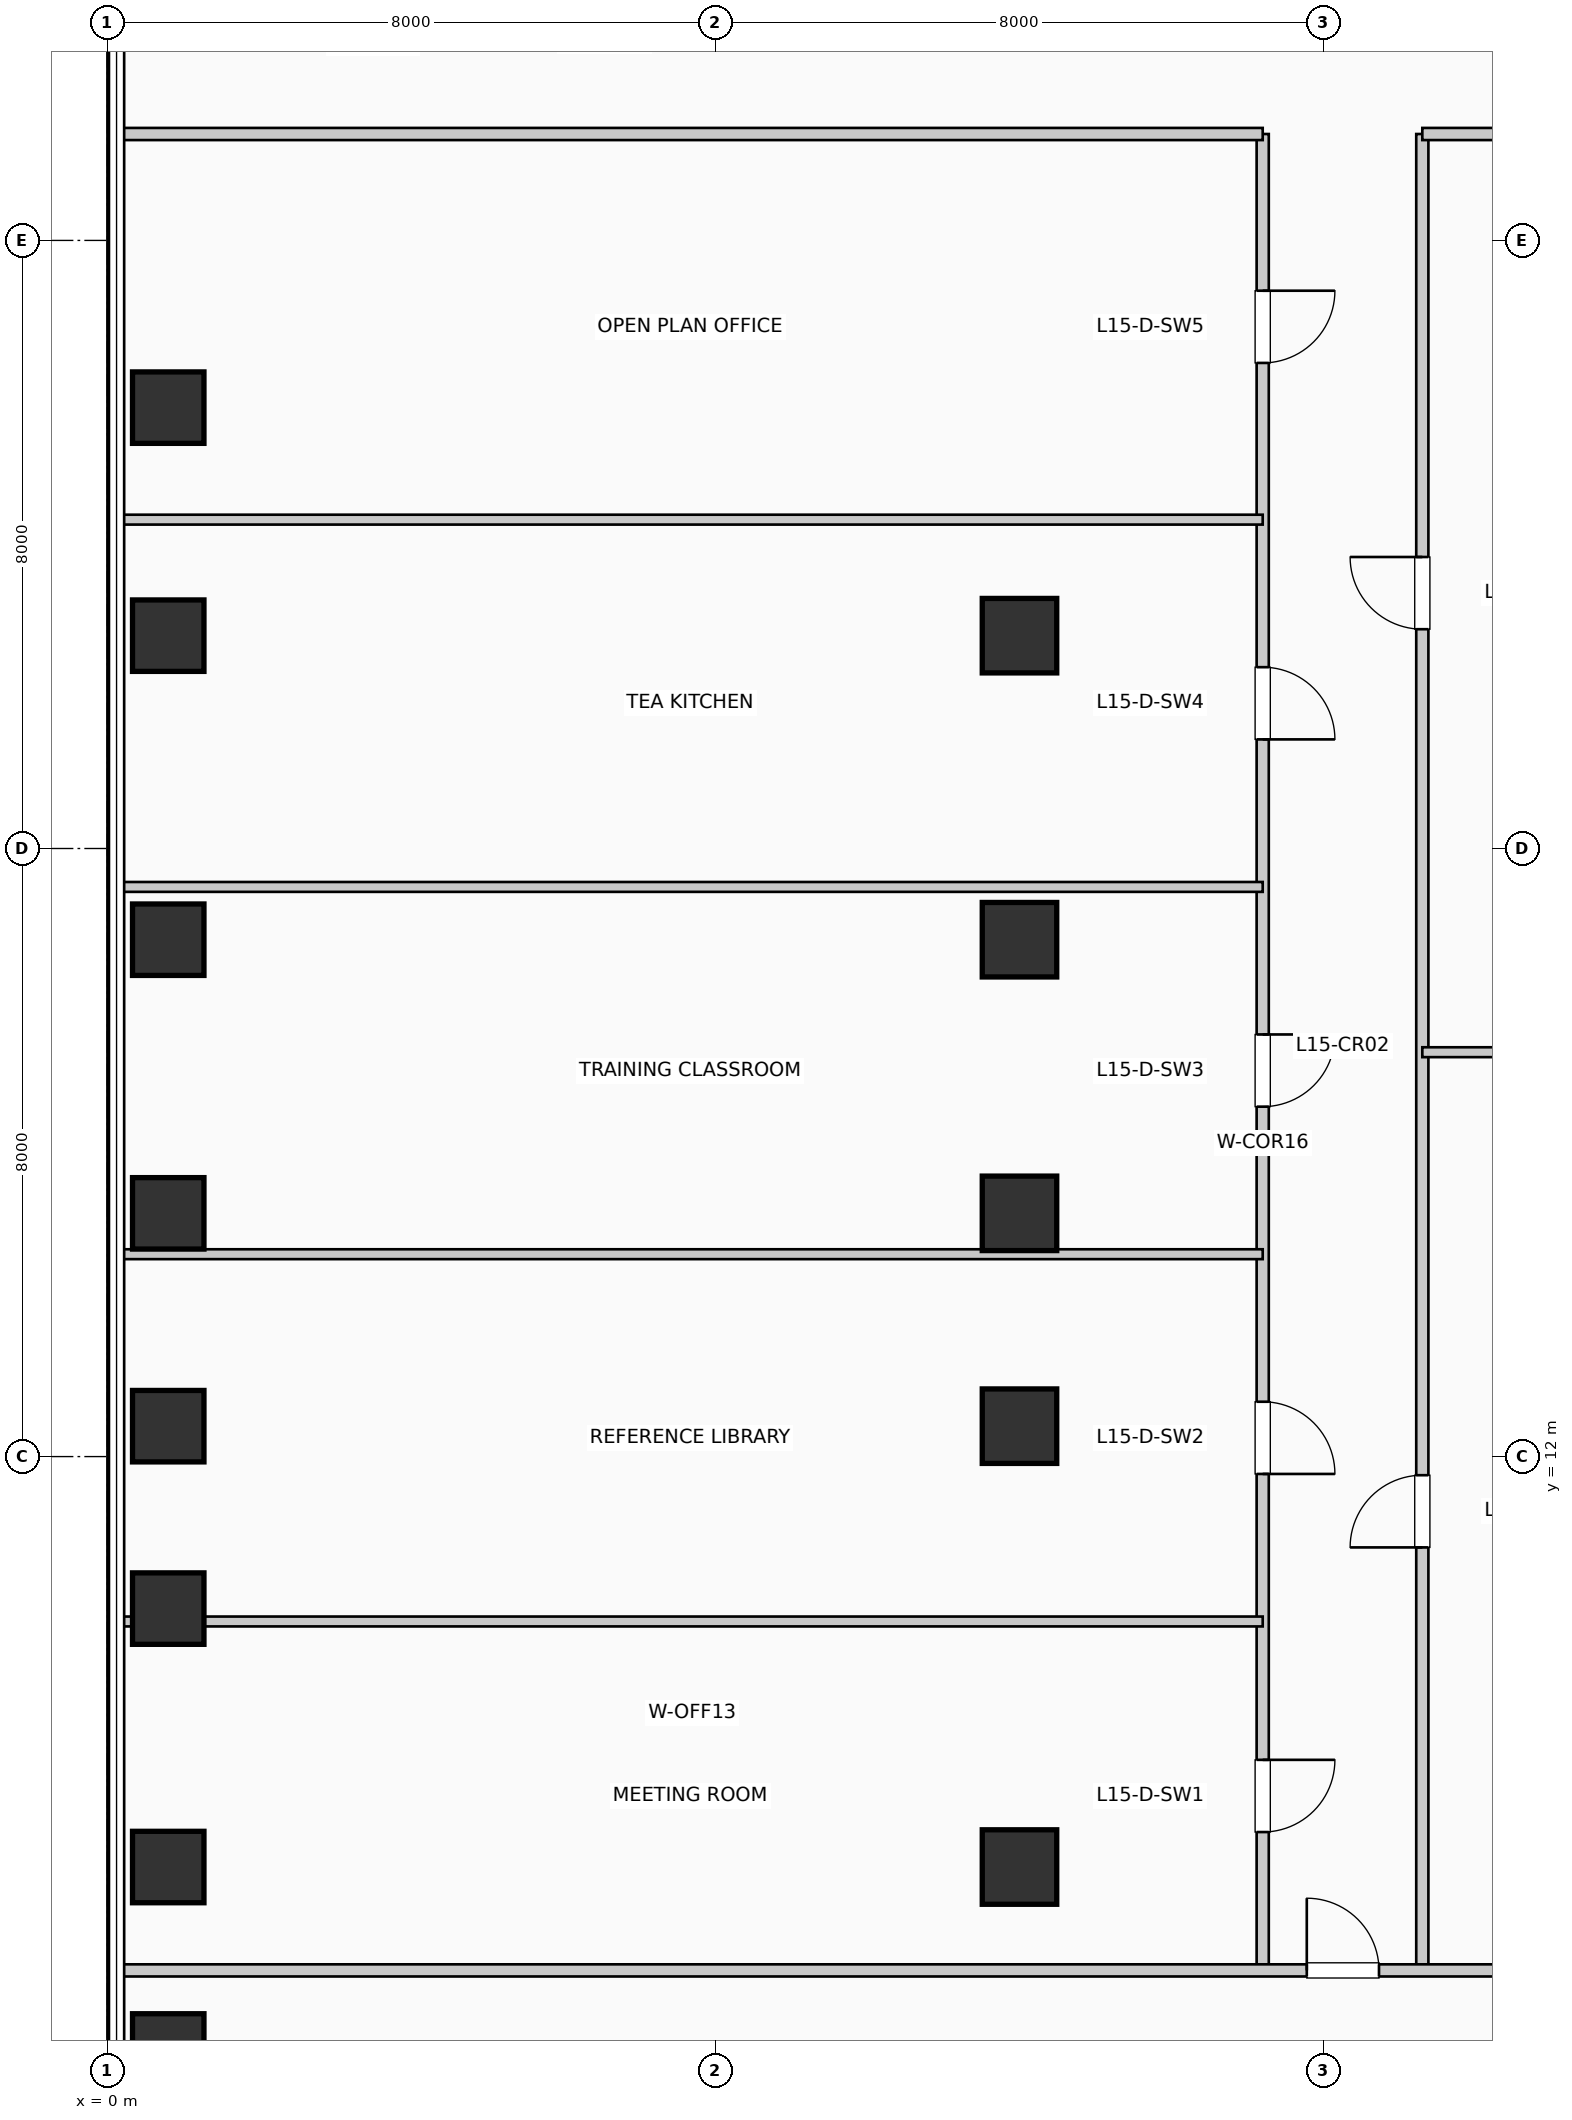
"""IFC4 building model, lengths in metres.
Left out: names, types, materials, properties, quantities, classifications, styles, units other than length and angle.
Written with IfcOpenShell. Run it as: python <this file> out.ifc"""

import sys

from ifc_helpers import new_model, si_unit, direction, frame, frame_2d, origin, origin_2d, place, context, subcontext, project, spatial, rectangle, extrude, element, fill, save


model = new_model("IFC4")
c1 = context("Model", 3, precision=1e-05, world=origin(), true_north=direction((0.0, 1.0)))
c2 = subcontext(c1, "Body", "Model", "MODEL_VIEW")
j1 = project(units=[si_unit("LENGTHUNIT", "METRE"), si_unit("PLANEANGLEUNIT", "RADIAN")], contexts=[c1])
p1 = place(None, origin())
s1 = spatial("IfcSite", under=j1, at=p1, CompositionType="ELEMENT")
p2 = place(p1, origin())
s2 = spatial("IfcBuilding", under=s1, at=p2, CompositionType="ELEMENT")
p3 = place(p2, frame((0.0, 0.0, 66.0)))
s3 = spatial("IfcBuildingStorey", under=s2, at=p3, CompositionType="ELEMENT", Elevation=66.0)
for number, where, z_axis, x_axis in (
    (1, (0.8, 4.2, 0.0), (0.0, 0.0, 1.0), (1.0, 0.0, 0.0)),
    (2, (0.8, 6.6, 0.0), (0.0, 0.0, 1.0), (1.0, 0.0, 0.0)),
    (3, (0.8, 10.0, 0.0), (0.0, 0.0, 1.0), (1.0, 0.0, 0.0)),
    (4, (0.8, 12.4, 0.0), (0.0, 0.0, 1.0), (1.0, 0.0, 0.0)),
    (5, (0.8, 15.2, 0.0), (0.0, 0.0, 1.0), (1.0, 0.0, 0.0)),
    (6, (0.8, 18.8, 0.0), (0.0, 0.0, 1.0), (1.0, 0.0, 0.0)),
    (7, (0.8, 22.8, 0.0), (0.0, 0.0, 1.0), (1.0, 0.0, 0.0)),
    (8, (0.8, 25.8, 0.0), (0.0, 0.0, 1.0), (1.0, 0.0, 0.0)),
):
    element("IfcColumn", number, at=place(p3, frame(where, z_axis=z_axis, x_axis=x_axis)), inside=s3, PredefinedType="COLUMN", context=c2, shape_type="SweptSolid", body=[
        extrude(rectangle(XDim=0.94, YDim=0.94, at=origin_2d()), origin(), (0.0, 0.0, 1.0), 3.96),
    ])
for number, where, z_axis, x_axis in (
    (9, (12.0, 6.6, 0.0), (0.0, 0.0, 1.0), (1.0, 0.0, 0.0)),
    (10, (12.0, 12.4, 0.0), (0.0, 0.0, 1.0), (1.0, 0.0, 0.0)),
    (11, (12.0, 15.2, 0.0), (0.0, 0.0, 1.0), (1.0, 0.0, 0.0)),
    (12, (12.0, 18.8, 0.0), (0.0, 0.0, 1.0), (1.0, 0.0, 0.0)),
    (13, (12.0, 22.8, 0.0), (0.0, 0.0, 1.0), (1.0, 0.0, 0.0)),
):
    element("IfcColumn", number, at=place(p3, frame(where, z_axis=z_axis, x_axis=x_axis)), inside=s3, PredefinedType="COLUMN", context=c2, shape_type="SweptSolid", body=[
        extrude(rectangle(XDim=0.98, YDim=0.98, at=origin_2d()), origin(), (0.0, 0.0, 1.0), 3.96),
    ])
p4 = place(p3, frame((15.2, 5.24, 0.0), z_axis=(0.0, 0.0, 1.0), x_axis=(0.0, 1.0, 0.0)))
e14 = element("IfcWall", 14, at=p4, inside=s3, PredefinedType="PARTITIONING", context=c2, shape_type="SweptSolid", body=[
    extrude(rectangle(XDim=24.16, YDim=0.16, at=frame_2d((12.08, 0.0))), origin(), (0.0, 0.0, 1.0), 3.71),
])
p5 = place(p4, frame((2.77, 0.0, 0.0), z_axis=(0.0, 0.0, 1.0), x_axis=(-1.0, 0.0, 0.0)))
e15 = element("IfcOpeningElement", 15, at=p5, cuts=e14, PredefinedType="OPENING", context=c2, shape_type="SweptSolid", body=[
    extrude(rectangle(XDim=0.95, YDim=2.15, at=frame_2d((0.475, 1.075))), frame((0.0, 0.09, 0.0), z_axis=(0.0, -1.0, 0.0), x_axis=(1.0, 0.0, 0.0)), (0.0, 0.0, 1.0), 0.18),
])
p6 = place(p4, frame((7.481, 0.0, 0.0), z_axis=(0.0, 0.0, 1.0), x_axis=(-1.0, 0.0, 0.0)))
e16 = element("IfcOpeningElement", 16, at=p6, cuts=e14, PredefinedType="OPENING", context=c2, shape_type="SweptSolid", body=[
    extrude(rectangle(XDim=0.95, YDim=2.15, at=frame_2d((0.475, 1.075))), frame((0.0, 0.09, 0.0), z_axis=(0.0, -1.0, 0.0), x_axis=(1.0, 0.0, 0.0)), (0.0, 0.0, 1.0), 0.18),
])
p7 = place(p4, frame((12.313, 0.0, 0.0), z_axis=(0.0, 0.0, 1.0), x_axis=(-1.0, 0.0, 0.0)))
e17 = element("IfcOpeningElement", 17, at=p7, cuts=e14, PredefinedType="OPENING", context=c2, shape_type="SweptSolid", body=[
    extrude(rectangle(XDim=0.95, YDim=2.15, at=frame_2d((0.475, 1.075))), frame((0.0, 0.09, 0.0), z_axis=(0.0, -1.0, 0.0), x_axis=(1.0, 0.0, 0.0)), (0.0, 0.0, 1.0), 0.18),
])
p8 = place(p4, frame((17.145, 0.0, 0.0), z_axis=(0.0, 0.0, 1.0), x_axis=(-1.0, 0.0, 0.0)))
e18 = element("IfcOpeningElement", 18, at=p8, cuts=e14, PredefinedType="OPENING", context=c2, shape_type="SweptSolid", body=[
    extrude(rectangle(XDim=0.95, YDim=2.15, at=frame_2d((0.475, 1.075))), frame((0.0, 0.09, 0.0), z_axis=(0.0, -1.0, 0.0), x_axis=(1.0, 0.0, 0.0)), (0.0, 0.0, 1.0), 0.18),
])
p9 = place(p4, frame((22.098, 0.0, 0.0), z_axis=(0.0, 0.0, 1.0), x_axis=(-1.0, 0.0, 0.0)))
e19 = element("IfcOpeningElement", 19, at=p9, cuts=e14, PredefinedType="OPENING", context=c2, shape_type="SweptSolid", body=[
    extrude(rectangle(XDim=0.95, YDim=2.15, at=frame_2d((0.475, 1.075))), frame((0.0, 0.09, 0.0), z_axis=(0.0, -1.0, 0.0), x_axis=(1.0, 0.0, 0.0)), (0.0, 0.0, 1.0), 0.18),
])
p10 = place(p3, frame((17.3, 5.24, 0.0), z_axis=(0.0, 0.0, 1.0), x_axis=(0.0, 1.0, 0.0)))
e20 = element("IfcWall", 20, at=p10, inside=s3, PredefinedType="PARTITIONING", context=c2, shape_type="SweptSolid", body=[
    extrude(rectangle(XDim=24.16, YDim=0.16, at=frame_2d((12.08, 0.0))), origin(), (0.0, 0.0, 1.0), 3.71),
])
p11 = place(p10, frame((5.565, 0.0, 0.0)))
e21 = element("IfcOpeningElement", 21, at=p11, cuts=e20, PredefinedType="OPENING", context=c2, shape_type="SweptSolid", body=[
    extrude(rectangle(XDim=0.95, YDim=2.15, at=frame_2d((0.475, 1.075))), frame((0.0, 0.09, 0.0), z_axis=(0.0, -1.0, 0.0), x_axis=(1.0, 0.0, 0.0)), (0.0, 0.0, 1.0), 0.18),
])
p12 = place(p10, frame((17.645, 0.0, 0.0)))
e22 = element("IfcOpeningElement", 22, at=p12, cuts=e20, PredefinedType="OPENING", context=c2, shape_type="SweptSolid", body=[
    extrude(rectangle(XDim=0.95, YDim=2.15, at=frame_2d((0.475, 1.075))), frame((0.0, 0.09, 0.0), z_axis=(0.0, -1.0, 0.0), x_axis=(1.0, 0.0, 0.0)), (0.0, 0.0, 1.0), 0.18),
])
p13 = place(p3, frame((0.19, 5.24, 0.0), z_axis=(0.0, 0.0, 1.0), x_axis=(1.0, 0.0, 0.0)))
e23 = element("IfcWall", 23, at=p13, inside=s3, PredefinedType="PARTITIONING", context=c2, shape_type="SweptSolid", body=[
    extrude(rectangle(XDim=23.26, YDim=0.16, at=frame_2d((11.63, 0.0))), origin(), (0.0, 0.0, 1.0), 3.71),
])
p14 = place(p13, frame((15.59, 0.0, 0.0)))
e24 = element("IfcOpeningElement", 24, at=p14, cuts=e23, PredefinedType="OPENING", context=c2, shape_type="SweptSolid", body=[
    extrude(rectangle(XDim=0.95, YDim=2.15, at=frame_2d((0.475, 1.075))), frame((0.0, 0.09, 0.0), z_axis=(0.0, -1.0, 0.0), x_axis=(1.0, 0.0, 0.0)), (0.0, 0.0, 1.0), 0.18),
])
p15 = place(p3, frame((0.19, 29.4, 0.0), z_axis=(0.0, 0.0, 1.0), x_axis=(1.0, 0.0, 0.0)))
e25 = element("IfcWall", 25, at=p15, inside=s3, PredefinedType="PARTITIONING", context=c2, shape_type="SweptSolid", body=[
    extrude(rectangle(XDim=15.01, YDim=0.16, at=frame_2d((7.505, 0.0))), origin(), (0.0, 0.0, 1.0), 3.365),
])
p16 = place(p3, frame((17.3, 29.4, 0.0), z_axis=(0.0, 0.0, 1.0), x_axis=(1.0, 0.0, 0.0)))
e26 = element("IfcWall", 26, at=p16, inside=s3, PredefinedType="PARTITIONING", context=c2, shape_type="SweptSolid", body=[
    extrude(rectangle(XDim=6.15, YDim=0.16, at=frame_2d((3.075, 0.0))), origin(), (0.0, 0.0, 1.0), 3.71),
])
p17 = place(p3, frame((0.19, 9.83, 0.0), z_axis=(0.0, 0.0, 1.0), x_axis=(1.0, 0.0, 0.0)))
e27 = element("IfcWall", 27, at=p17, inside=s3, PredefinedType="PARTITIONING", context=c2, shape_type="SweptSolid", body=[
    extrude(rectangle(XDim=15.01, YDim=0.13, at=frame_2d((7.505, 0.0))), origin(), (0.0, 0.0, 1.0), 2.995),
])
for number, where, z_axis, x_axis in (
    (28, (0.19, 14.662, 0.0), (0.0, 0.0, 1.0), (1.0, 0.0, 0.0)),
    (29, (0.19, 19.494, 0.0), (0.0, 0.0, 1.0), (1.0, 0.0, 0.0)),
    (30, (0.19, 24.326, 0.0), (0.0, 0.0, 1.0), (1.0, 0.0, 0.0)),
):
    element("IfcWall", number, at=place(p3, frame(where, z_axis=z_axis, x_axis=x_axis)), inside=s3, PredefinedType="PARTITIONING", context=c2, shape_type="SweptSolid", body=[
        extrude(rectangle(XDim=15.01, YDim=0.13, at=frame_2d((7.505, 0.0))), origin(), (0.0, 0.0, 1.0), 3.71),
    ])
p18 = place(p3, frame((17.3, 17.32, 0.0), z_axis=(0.0, 0.0, 1.0), x_axis=(1.0, 0.0, 0.0)))
e31 = element("IfcWall", 31, at=p18, inside=s3, PredefinedType="PARTITIONING", context=c2, shape_type="SweptSolid", body=[
    extrude(rectangle(XDim=6.15, YDim=0.13, at=frame_2d((3.075, 0.0))), origin(), (0.0, 0.0, 1.0), 3.71),
])
p19 = place(p14, origin())
e32 = element("IfcDoor", 32, at=p19, inside=s3, OperationType="SINGLE_SWING_LEFT", PredefinedType="DOOR", context=c2, shape_type="SweptSolid", body=[
    extrude(rectangle(XDim=0.95, YDim=2.15, at=frame_2d((0.475, 1.075))), frame((0.0, 0.025, 0.0), z_axis=(0.0, -1.0, 0.0), x_axis=(1.0, 0.0, 0.0)), (0.0, 0.0, 1.0), 0.05),
])
fill(e24, e32)
p20 = place(p5, origin())
e33 = element("IfcDoor", 33, at=p20, inside=s3, OperationType="SINGLE_SWING_RIGHT", PredefinedType="DOOR", context=c2, shape_type="SweptSolid", body=[
    extrude(rectangle(XDim=0.95, YDim=2.15, at=frame_2d((0.475, 1.075))), frame((0.0, 0.025, 0.0), z_axis=(0.0, -1.0, 0.0), x_axis=(1.0, 0.0, 0.0)), (0.0, 0.0, 1.0), 0.05),
])
fill(e15, e33)
p21 = place(p6, origin())
e34 = element("IfcDoor", 34, at=p21, inside=s3, OperationType="SINGLE_SWING_LEFT", PredefinedType="DOOR", context=c2, shape_type="SweptSolid", body=[
    extrude(rectangle(XDim=0.95, YDim=2.15, at=frame_2d((0.475, 1.075))), frame((0.0, 0.025, 0.0), z_axis=(0.0, -1.0, 0.0), x_axis=(1.0, 0.0, 0.0)), (0.0, 0.0, 1.0), 0.05),
])
fill(e16, e34)
p22 = place(p7, origin())
e35 = element("IfcDoor", 35, at=p22, inside=s3, OperationType="SINGLE_SWING_RIGHT", PredefinedType="DOOR", context=c2, shape_type="SweptSolid", body=[
    extrude(rectangle(XDim=0.95, YDim=2.15, at=frame_2d((0.475, 1.075))), frame((0.0, 0.025, 0.0), z_axis=(0.0, -1.0, 0.0), x_axis=(1.0, 0.0, 0.0)), (0.0, 0.0, 1.0), 0.05),
])
fill(e17, e35)
p23 = place(p8, origin())
e36 = element("IfcDoor", 36, at=p23, inside=s3, OperationType="SINGLE_SWING_LEFT", PredefinedType="DOOR", context=c2, shape_type="SweptSolid", body=[
    extrude(rectangle(XDim=0.95, YDim=2.15, at=frame_2d((0.475, 1.075))), frame((0.0, 0.025, 0.0), z_axis=(0.0, -1.0, 0.0), x_axis=(1.0, 0.0, 0.0)), (0.0, 0.0, 1.0), 0.05),
])
fill(e18, e36)
p24 = place(p9, origin())
e37 = element("IfcDoor", 37, at=p24, inside=s3, OperationType="SINGLE_SWING_RIGHT", PredefinedType="DOOR", context=c2, shape_type="SweptSolid", body=[
    extrude(rectangle(XDim=0.95, YDim=2.15, at=frame_2d((0.475, 1.075))), frame((0.0, 0.025, 0.0), z_axis=(0.0, -1.0, 0.0), x_axis=(1.0, 0.0, 0.0)), (0.0, 0.0, 1.0), 0.05),
])
fill(e19, e37)
p25 = place(p11, origin())
e38 = element("IfcDoor", 38, at=p25, inside=s3, OperationType="SINGLE_SWING_LEFT", PredefinedType="DOOR", context=c2, shape_type="SweptSolid", body=[
    extrude(rectangle(XDim=0.95, YDim=2.15, at=frame_2d((0.475, 1.075))), frame((0.0, 0.025, 0.0), z_axis=(0.0, -1.0, 0.0), x_axis=(1.0, 0.0, 0.0)), (0.0, 0.0, 1.0), 0.05),
])
fill(e21, e38)
p26 = place(p12, origin())
e39 = element("IfcDoor", 39, at=p26, inside=s3, OperationType="SINGLE_SWING_RIGHT", PredefinedType="DOOR", context=c2, shape_type="SweptSolid", body=[
    extrude(rectangle(XDim=0.95, YDim=2.15, at=frame_2d((0.475, 1.075))), frame((0.0, 0.025, 0.0), z_axis=(0.0, -1.0, 0.0), x_axis=(1.0, 0.0, 0.0)), (0.0, 0.0, 1.0), 0.05),
])
fill(e22, e39)
save(model, sys.argv[1])
